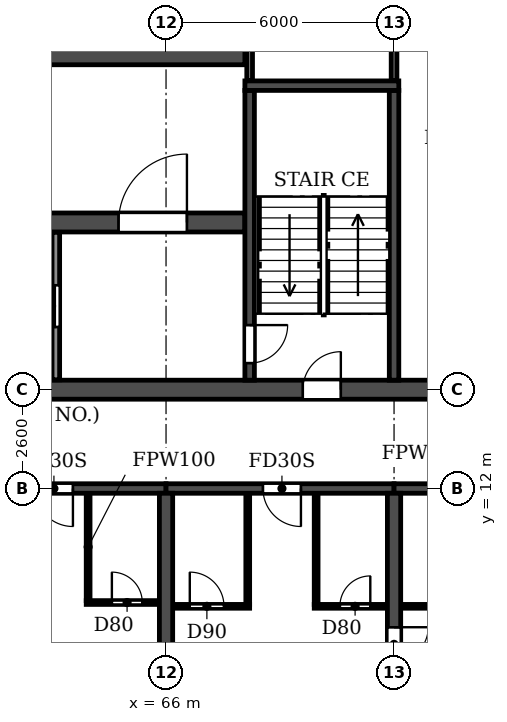
"""IFC4 building model, lengths in metres.
Left out: names, types, materials, properties, quantities, classifications, styles, units other than length and angle.
Written with IfcOpenShell. Run it as: python <this file> out.ifc"""

import sys

from ifc_helpers import new_model, si_unit, direction, frame, frame_2d, origin, place, context, subcontext, project, spatial, rectangle, extrude, element, fill, save


model = new_model("IFC4")
c1 = context("Model", 3, precision=1e-05, world=origin(), true_north=direction((0.0, 1.0)))
c2 = subcontext(c1, "Body", "Model", "MODEL_VIEW")
j1 = project(units=[si_unit("LENGTHUNIT", "METRE"), si_unit("PLANEANGLEUNIT", "RADIAN")], contexts=[c1])
p1 = place(None, origin())
s1 = spatial("IfcSite", under=j1, at=p1, CompositionType="ELEMENT")
p2 = place(p1, origin())
s2 = spatial("IfcBuilding", under=s1, at=p2, CompositionType="ELEMENT")
p3 = place(p2, frame((0.0, 0.0, 102.6)))
s3 = spatial("IfcBuildingStorey", under=s2, at=p3, CompositionType="ELEMENT", Elevation=102.6)
p4 = place(p3, frame((66.0, 0.2, 0.0), z_axis=(0.0, 0.0, 1.0), x_axis=(0.0, 1.0, 0.0)))
e1 = element("IfcWall", 1, at=p4, inside=s3, PredefinedType="SHEAR", context=c2, shape_type="SweptSolid", body=[
    extrude(rectangle(XDim=11.675, YDim=0.35, at=frame_2d((5.837, 0.0))), origin(), (0.0, 0.0, 1.0), 3.0),
])
p5 = place(p3, frame((72.0, 0.2, 0.0), z_axis=(0.0, 0.0, 1.0), x_axis=(0.0, 1.0, 0.0)))
e2 = element("IfcWall", 2, at=p5, inside=s3, PredefinedType="SHEAR", context=c2, shape_type="SweptSolid", body=[
    extrude(rectangle(XDim=11.675, YDim=0.35, at=frame_2d((5.837, 0.0))), origin(), (0.0, 0.0, 1.0), 3.0),
])
p6 = place(p5, frame((7.25, 0.0, 0.0)))
e3 = element("IfcOpeningElement", 3, at=p6, cuts=e2, PredefinedType="OPENING", context=c2, shape_type="SweptSolid", body=[
    extrude(rectangle(XDim=0.9, YDim=2.1, at=frame_2d((0.45, 1.05))), frame((0.0, 0.185, 0.0), z_axis=(0.0, -1.0, 0.0), x_axis=(1.0, 0.0, 0.0)), (0.0, 0.0, 1.0), 0.37),
])
p7 = place(p3, frame((60.0, 12.0, 0.0), z_axis=(0.0, 0.0, 1.0), x_axis=(1.0, 0.0, 0.0)))
e4 = element("IfcWall", 4, at=p7, inside=s3, PredefinedType="SHEAR", context=c2, shape_type="SweptSolid", body=[
    extrude(rectangle(XDim=6.0, YDim=0.25, at=frame_2d((3.0, 0.0))), origin(), (0.0, 0.0, 1.0), 2.4),
])
p8 = place(p7, frame((2.55, 0.0, 0.0)))
e5 = element("IfcOpeningElement", 5, at=p8, cuts=e4, PredefinedType="OPENING", context=c2, shape_type="SweptSolid", body=[
    extrude(rectangle(XDim=1.0, YDim=2.1, at=frame_2d((0.5, 1.05))), frame((0.0, 0.135, 0.0), z_axis=(0.0, -1.0, 0.0), x_axis=(1.0, 0.0, 0.0)), (0.0, 0.0, 1.0), 0.27),
])
p9 = place(p3, frame((66.0, 12.0, 0.0), z_axis=(0.0, 0.0, 1.0), x_axis=(1.0, 0.0, 0.0)))
e6 = element("IfcWall", 6, at=p9, inside=s3, PredefinedType="SHEAR", context=c2, shape_type="SweptSolid", body=[
    extrude(rectangle(XDim=6.0, YDim=0.25, at=frame_2d((3.0, 0.0))), origin(), (0.0, 0.0, 1.0), 2.4),
])
p10 = place(p9, frame((2.55, 0.0, 0.0)))
e7 = element("IfcOpeningElement", 7, at=p10, cuts=e6, PredefinedType="OPENING", context=c2, shape_type="SweptSolid", body=[
    extrude(rectangle(XDim=1.0, YDim=2.1, at=frame_2d((0.5, 1.05))), frame((0.0, 0.135, 0.0), z_axis=(0.0, -1.0, 0.0), x_axis=(1.0, 0.0, 0.0)), (0.0, 0.0, 1.0), 0.27),
])
p11 = place(p3, frame((72.0, 12.0, 0.0), z_axis=(0.0, 0.0, 1.0), x_axis=(1.0, 0.0, 0.0)))
e8 = element("IfcWall", 8, at=p11, inside=s3, PredefinedType="SHEAR", context=c2, shape_type="SweptSolid", body=[
    extrude(rectangle(XDim=6.0, YDim=0.25, at=frame_2d((3.0, 0.0))), origin(), (0.0, 0.0, 1.0), 2.4),
])
p12 = place(p3, frame((8.6, 14.6, 0.0), z_axis=(0.0, 0.0, 1.0), x_axis=(1.0, 0.0, 0.0)))
e9 = element("IfcWall", 9, at=p12, inside=s3, PredefinedType="SOLIDWALL", context=c2, shape_type="SweptSolid", body=[
    extrude(rectangle(XDim=84.8, YDim=0.5, at=frame_2d((42.4, 0.0))), origin(), (0.0, 0.0, 1.0), 3.0),
])
p13 = place(p12, frame((0.9, 0.0, 0.0)))
e10 = element("IfcOpeningElement", 10, at=p13, cuts=e9, PredefinedType="OPENING", context=c2, shape_type="SweptSolid", body=[
    extrude(rectangle(XDim=1.0, YDim=2.1, at=frame_2d((0.5, 1.05))), frame((0.0, 0.26, 0.0), z_axis=(0.0, -1.0, 0.0), x_axis=(1.0, 0.0, 0.0)), (0.0, 0.0, 1.0), 0.52),
])
p14 = place(p12, frame((5.6, 0.0, 0.0)))
e11 = element("IfcOpeningElement", 11, at=p14, cuts=e9, PredefinedType="OPENING", context=c2, shape_type="SweptSolid", body=[
    extrude(rectangle(XDim=1.0, YDim=2.1, at=frame_2d((0.5, 1.05))), frame((0.0, 0.26, 0.0), z_axis=(0.0, -1.0, 0.0), x_axis=(1.0, 0.0, 0.0)), (0.0, 0.0, 1.0), 0.52),
])
p15 = place(p12, frame((10.3, 0.0, 0.0)))
e12 = element("IfcOpeningElement", 12, at=p15, cuts=e9, PredefinedType="OPENING", context=c2, shape_type="SweptSolid", body=[
    extrude(rectangle(XDim=1.0, YDim=2.1, at=frame_2d((0.5, 1.05))), frame((0.0, 0.26, 0.0), z_axis=(0.0, -1.0, 0.0), x_axis=(1.0, 0.0, 0.0)), (0.0, 0.0, 1.0), 0.52),
])
p16 = place(p12, frame((18.2, 0.0, 0.0)))
e13 = element("IfcOpeningElement", 13, at=p16, cuts=e9, PredefinedType="OPENING", context=c2, shape_type="SweptSolid", body=[
    extrude(rectangle(XDim=1.0, YDim=2.1, at=frame_2d((0.5, 1.05))), frame((0.0, 0.26, 0.0), z_axis=(0.0, -1.0, 0.0), x_axis=(1.0, 0.0, 0.0)), (0.0, 0.0, 1.0), 0.52),
])
p17 = place(p12, frame((22.8, 0.0, 0.0)))
e14 = element("IfcOpeningElement", 14, at=p17, cuts=e9, PredefinedType="OPENING", context=c2, shape_type="SweptSolid", body=[
    extrude(rectangle(XDim=1.0, YDim=2.1, at=frame_2d((0.5, 1.05))), frame((0.0, 0.26, 0.0), z_axis=(0.0, -1.0, 0.0), x_axis=(1.0, 0.0, 0.0)), (0.0, 0.0, 1.0), 0.52),
])
p18 = place(p12, frame((36.7, 0.0, 0.0)))
e15 = element("IfcOpeningElement", 15, at=p18, cuts=e9, PredefinedType="OPENING", context=c2, shape_type="SweptSolid", body=[
    extrude(rectangle(XDim=1.0, YDim=2.1, at=frame_2d((0.5, 1.05))), frame((0.0, 0.26, 0.0), z_axis=(0.0, -1.0, 0.0), x_axis=(1.0, 0.0, 0.0)), (0.0, 0.0, 1.0), 0.52),
])
p19 = place(p12, frame((41.9, 0.0, 0.0)))
e16 = element("IfcOpeningElement", 16, at=p19, cuts=e9, PredefinedType="OPENING", context=c2, shape_type="SweptSolid", body=[
    extrude(rectangle(XDim=1.0, YDim=2.1, at=frame_2d((0.5, 1.05))), frame((0.0, 0.26, 0.0), z_axis=(0.0, -1.0, 0.0), x_axis=(1.0, 0.0, 0.0)), (0.0, 0.0, 1.0), 0.52),
])
p20 = place(p12, frame((47.1, 0.0, 0.0)))
e17 = element("IfcOpeningElement", 17, at=p20, cuts=e9, PredefinedType="OPENING", context=c2, shape_type="SweptSolid", body=[
    extrude(rectangle(XDim=1.0, YDim=2.1, at=frame_2d((0.5, 1.05))), frame((0.0, 0.26, 0.0), z_axis=(0.0, -1.0, 0.0), x_axis=(1.0, 0.0, 0.0)), (0.0, 0.0, 1.0), 0.52),
])
p21 = place(p12, frame((61.0, 0.0, 0.0)))
e18 = element("IfcOpeningElement", 18, at=p21, cuts=e9, PredefinedType="OPENING", context=c2, shape_type="SweptSolid", body=[
    extrude(rectangle(XDim=1.0, YDim=2.1, at=frame_2d((0.5, 1.05))), frame((0.0, 0.26, 0.0), z_axis=(0.0, -1.0, 0.0), x_axis=(1.0, 0.0, 0.0)), (0.0, 0.0, 1.0), 0.52),
])
p22 = place(p12, frame((65.6, 0.0, 0.0)))
e19 = element("IfcOpeningElement", 19, at=p22, cuts=e9, PredefinedType="OPENING", context=c2, shape_type="SweptSolid", body=[
    extrude(rectangle(XDim=1.0, YDim=2.1, at=frame_2d((0.5, 1.05))), frame((0.0, 0.26, 0.0), z_axis=(0.0, -1.0, 0.0), x_axis=(1.0, 0.0, 0.0)), (0.0, 0.0, 1.0), 0.52),
])
p23 = place(p12, frame((73.5, 0.0, 0.0)))
e20 = element("IfcOpeningElement", 20, at=p23, cuts=e9, PredefinedType="OPENING", context=c2, shape_type="SweptSolid", body=[
    extrude(rectangle(XDim=1.0, YDim=2.1, at=frame_2d((0.5, 1.05))), frame((0.0, 0.26, 0.0), z_axis=(0.0, -1.0, 0.0), x_axis=(1.0, 0.0, 0.0)), (0.0, 0.0, 1.0), 0.52),
])
p24 = place(p12, frame((79.6, 0.0, 0.0)))
e21 = element("IfcOpeningElement", 21, at=p24, cuts=e9, PredefinedType="OPENING", context=c2, shape_type="SweptSolid", body=[
    extrude(rectangle(XDim=1.0, YDim=2.1, at=frame_2d((0.5, 1.05))), frame((0.0, 0.26, 0.0), z_axis=(0.0, -1.0, 0.0), x_axis=(1.0, 0.0, 0.0)), (0.0, 0.0, 1.0), 0.52),
])
p25 = place(p3, frame((33.925, 19.0, 0.0), z_axis=(0.0, 0.0, 1.0), x_axis=(1.0, 0.0, 0.0)))
e22 = element("IfcWall", 22, at=p25, inside=s3, PredefinedType="SOLIDWALL", context=c2, shape_type="SweptSolid", body=[
    extrude(rectangle(XDim=34.15, YDim=0.5, at=frame_2d((17.075, 0.0))), origin(), (0.0, 0.0, 1.0), 3.0),
])
p26 = place(p25, frame((16.175, 0.0, 0.0)))
e23 = element("IfcOpeningElement", 23, at=p26, cuts=e22, PredefinedType="OPENING", context=c2, shape_type="SweptSolid", body=[
    extrude(rectangle(XDim=1.8, YDim=2.1, at=frame_2d((0.9, 1.05))), frame((0.0, 0.26, 0.0), z_axis=(0.0, -1.0, 0.0), x_axis=(1.0, 0.0, 0.0)), (0.0, 0.0, 1.0), 0.52),
])
p27 = place(p25, frame((1.525, 0.0, 0.0)))
e24 = element("IfcOpeningElement", 24, at=p27, cuts=e22, PredefinedType="OPENING", context=c2, shape_type="SweptSolid", body=[
    extrude(rectangle(XDim=1.8, YDim=2.1, at=frame_2d((0.9, 1.05))), frame((0.0, 0.26, 0.0), z_axis=(0.0, -1.0, 0.0), x_axis=(1.0, 0.0, 0.0)), (0.0, 0.0, 1.0), 0.52),
])
p28 = place(p25, frame((8.725, 0.0, 0.0)))
e25 = element("IfcOpeningElement", 25, at=p28, cuts=e22, PredefinedType="OPENING", context=c2, shape_type="SweptSolid", body=[
    extrude(rectangle(XDim=1.1, YDim=2.1, at=frame_2d((0.55, 1.05))), frame((0.0, 0.26, 0.0), z_axis=(0.0, -1.0, 0.0), x_axis=(1.0, 0.0, 0.0)), (0.0, 0.0, 1.0), 0.52),
])
p29 = place(p25, frame((11.325, 0.0, 0.0)))
e26 = element("IfcOpeningElement", 26, at=p29, cuts=e22, PredefinedType="OPENING", context=c2, shape_type="SweptSolid", body=[
    extrude(rectangle(XDim=1.1, YDim=2.1, at=frame_2d((0.55, 1.05))), frame((0.0, 0.26, 0.0), z_axis=(0.0, -1.0, 0.0), x_axis=(1.0, 0.0, 0.0)), (0.0, 0.0, 1.0), 0.52),
])
p30 = place(p25, frame((13.925, 0.0, 0.0)))
e27 = element("IfcOpeningElement", 27, at=p30, cuts=e22, PredefinedType="OPENING", context=c2, shape_type="SweptSolid", body=[
    extrude(rectangle(XDim=1.1, YDim=2.1, at=frame_2d((0.55, 1.05))), frame((0.0, 0.26, 0.0), z_axis=(0.0, -1.0, 0.0), x_axis=(1.0, 0.0, 0.0)), (0.0, 0.0, 1.0), 0.52),
])
p31 = place(p25, frame((19.125, 0.0, 0.0)))
e28 = element("IfcOpeningElement", 28, at=p31, cuts=e22, PredefinedType="OPENING", context=c2, shape_type="SweptSolid", body=[
    extrude(rectangle(XDim=1.1, YDim=2.1, at=frame_2d((0.55, 1.05))), frame((0.0, 0.26, 0.0), z_axis=(0.0, -1.0, 0.0), x_axis=(1.0, 0.0, 0.0)), (0.0, 0.0, 1.0), 0.52),
])
p32 = place(p25, frame((21.725, 0.0, 0.0)))
e29 = element("IfcOpeningElement", 29, at=p32, cuts=e22, PredefinedType="OPENING", context=c2, shape_type="SweptSolid", body=[
    extrude(rectangle(XDim=1.1, YDim=2.1, at=frame_2d((0.55, 1.05))), frame((0.0, 0.26, 0.0), z_axis=(0.0, -1.0, 0.0), x_axis=(1.0, 0.0, 0.0)), (0.0, 0.0, 1.0), 0.52),
])
p33 = place(p25, frame((24.325, 0.0, 0.0)))
e30 = element("IfcOpeningElement", 30, at=p33, cuts=e22, PredefinedType="OPENING", context=c2, shape_type="SweptSolid", body=[
    extrude(rectangle(XDim=1.1, YDim=2.1, at=frame_2d((0.55, 1.05))), frame((0.0, 0.26, 0.0), z_axis=(0.0, -1.0, 0.0), x_axis=(1.0, 0.0, 0.0)), (0.0, 0.0, 1.0), 0.52),
])
p34 = place(p25, frame((30.825, 0.0, 0.0)))
e31 = element("IfcOpeningElement", 31, at=p34, cuts=e22, PredefinedType="OPENING", context=c2, shape_type="SweptSolid", body=[
    extrude(rectangle(XDim=1.8, YDim=2.1, at=frame_2d((0.9, 1.05))), frame((0.0, 0.26, 0.0), z_axis=(0.0, -1.0, 0.0), x_axis=(1.0, 0.0, 0.0)), (0.0, 0.0, 1.0), 0.52),
])
p35 = place(p3, frame((33.925, 23.4, 0.0), z_axis=(0.0, 0.0, 1.0), x_axis=(1.0, 0.0, 0.0)))
e32 = element("IfcWall", 32, at=p35, inside=s3, PredefinedType="SOLIDWALL", context=c2, shape_type="SweptSolid", body=[
    extrude(rectangle(XDim=34.15, YDim=0.5, at=frame_2d((17.075, 0.0))), origin(), (0.0, 0.0, 1.0), 3.0),
])
p36 = place(p35, frame((16.175, 0.0, 0.0)))
e33 = element("IfcOpeningElement", 33, at=p36, cuts=e32, PredefinedType="OPENING", context=c2, shape_type="SweptSolid", body=[
    extrude(rectangle(XDim=1.8, YDim=2.1, at=frame_2d((0.9, 1.05))), frame((0.0, 0.26, 0.0), z_axis=(0.0, -1.0, 0.0), x_axis=(1.0, 0.0, 0.0)), (0.0, 0.0, 1.0), 0.52),
])
p37 = place(p35, frame((11.025, 0.0, 0.0)))
e34 = element("IfcOpeningElement", 34, at=p37, cuts=e32, PredefinedType="OPENING", context=c2, shape_type="SweptSolid", body=[
    extrude(rectangle(XDim=1.1, YDim=2.1, at=frame_2d((0.55, 1.05))), frame((0.0, 0.26, 0.0), z_axis=(0.0, -1.0, 0.0), x_axis=(1.0, 0.0, 0.0)), (0.0, 0.0, 1.0), 0.52),
])
p38 = place(p3, frame((68.2, 14.85, 0.0), z_axis=(0.0, 0.0, 1.0), x_axis=(0.0, 1.0, 0.0)))
e35 = element("IfcWall", 35, at=p38, inside=s3, PredefinedType="SOLIDWALL", context=c2, shape_type="SweptSolid", body=[
    extrude(rectangle(XDim=7.625, YDim=0.25, at=frame_2d((3.812, 0.0))), origin(), (0.0, 0.0, 1.0), 3.0),
])
p39 = place(p38, frame((0.45, 0.0, 0.0)))
e36 = element("IfcOpeningElement", 36, at=p39, cuts=e35, PredefinedType="OPENING", context=c2, shape_type="SweptSolid", body=[
    extrude(rectangle(XDim=1.0, YDim=2.1, at=frame_2d((0.5, 1.05))), frame((0.0, 0.135, 0.0), z_axis=(0.0, -1.0, 0.0), x_axis=(1.0, 0.0, 0.0)), (0.0, 0.0, 1.0), 0.27),
])
p40 = place(p3, frame((72.0, 14.85, 0.0), z_axis=(0.0, 0.0, 1.0), x_axis=(0.0, 1.0, 0.0)))
e37 = element("IfcWall", 37, at=p40, inside=s3, PredefinedType="SOLIDWALL", context=c2, shape_type="SweptSolid", body=[
    extrude(rectangle(XDim=7.625, YDim=0.25, at=frame_2d((3.812, 0.0))), origin(), (0.0, 0.0, 1.0), 3.0),
])
p41 = place(p3, frame((68.075, 22.6, 0.0), z_axis=(0.0, 0.0, 1.0), x_axis=(1.0, 0.0, 0.0)))
e38 = element("IfcWall", 38, at=p41, inside=s3, PredefinedType="SOLIDWALL", context=c2, shape_type="SweptSolid", body=[
    extrude(rectangle(XDim=4.05, YDim=0.25, at=frame_2d((2.025, 0.0))), origin(), (0.0, 0.0, 1.0), 3.0),
])
p42 = place(p3, frame((66.185, 8.9, 0.0), z_axis=(0.0, 0.0, 1.0), x_axis=(1.0, 0.0, 0.0)))
e39 = element("IfcWall", 39, at=p42, inside=s3, PredefinedType="PARTITIONING", context=c2, shape_type="SweptSolid", body=[
    extrude(rectangle(XDim=2.015, YDim=0.1, at=frame_2d((1.007, 0.0))), origin(), (0.0, 0.0, 1.0), 3.0),
])
p43 = place(p42, frame((0.44, 0.0, 0.0)))
e40 = element("IfcOpeningElement", 40, at=p43, cuts=e39, PredefinedType="OPENING", context=c2, shape_type="SweptSolid", body=[
    extrude(rectangle(XDim=0.9, YDim=2.1, at=frame_2d((0.45, 1.05))), frame((0.0, 0.06, 0.0), z_axis=(0.0, -1.0, 0.0), x_axis=(1.0, 0.0, 0.0)), (0.0, 0.0, 1.0), 0.12),
])
p44 = place(p3, frame((69.9, 8.9, 0.0), z_axis=(0.0, 0.0, 1.0), x_axis=(1.0, 0.0, 0.0)))
e41 = element("IfcWall", 41, at=p44, inside=s3, PredefinedType="PARTITIONING", context=c2, shape_type="SweptSolid", body=[
    extrude(rectangle(XDim=1.915, YDim=0.1, at=frame_2d((0.958, 0.0))), origin(), (0.0, 0.0, 1.0), 3.0),
])
p45 = place(p44, frame((0.675, 0.0, 0.0)))
e42 = element("IfcOpeningElement", 42, at=p45, cuts=e41, PredefinedType="OPENING", context=c2, shape_type="SweptSolid", body=[
    extrude(rectangle(XDim=0.8, YDim=2.1, at=frame_2d((0.4, 1.05))), frame((0.0, 0.06, 0.0), z_axis=(0.0, -1.0, 0.0), x_axis=(1.0, 0.0, 0.0)), (0.0, 0.0, 1.0), 0.12),
])
p46 = place(p3, frame((72.185, 8.9, 0.0), z_axis=(0.0, 0.0, 1.0), x_axis=(1.0, 0.0, 0.0)))
e43 = element("IfcWall", 43, at=p46, inside=s3, PredefinedType="PARTITIONING", context=c2, shape_type="SweptSolid", body=[
    extrude(rectangle(XDim=2.715, YDim=0.1, at=frame_2d((1.357, 0.0))), origin(), (0.0, 0.0, 1.0), 3.0),
])
p47 = place(p46, frame((0.915, 0.0, 0.0)))
e44 = element("IfcOpeningElement", 44, at=p47, cuts=e43, PredefinedType="OPENING", context=c2, shape_type="SweptSolid", body=[
    extrude(rectangle(XDim=0.8, YDim=2.1, at=frame_2d((0.4, 1.05))), frame((0.0, 0.06, 0.0), z_axis=(0.0, -1.0, 0.0), x_axis=(1.0, 0.0, 0.0)), (0.0, 0.0, 1.0), 0.12),
])
p48 = place(p3, frame((63.9, 9.0, 0.0), z_axis=(0.0, 0.0, 1.0), x_axis=(1.0, 0.0, 0.0)))
e45 = element("IfcWall", 45, at=p48, inside=s3, PredefinedType="PARTITIONING", context=c2, shape_type="SweptSolid", body=[
    extrude(rectangle(XDim=1.915, YDim=0.1, at=frame_2d((0.958, 0.0))), origin(), (0.0, 0.0, 1.0), 3.0),
])
p49 = place(p48, frame((0.675, 0.0, 0.0)))
e46 = element("IfcOpeningElement", 46, at=p49, cuts=e45, PredefinedType="OPENING", context=c2, shape_type="SweptSolid", body=[
    extrude(rectangle(XDim=0.8, YDim=2.1, at=frame_2d((0.4, 1.05))), frame((0.0, 0.06, 0.0), z_axis=(0.0, -1.0, 0.0), x_axis=(1.0, 0.0, 0.0)), (0.0, 0.0, 1.0), 0.12),
])
p50 = place(p3, frame((63.95, 9.05, 0.0), z_axis=(0.0, 0.0, 1.0), x_axis=(0.0, 1.0, 0.0)))
e47 = element("IfcWall", 47, at=p50, inside=s3, PredefinedType="PARTITIONING", context=c2, shape_type="SweptSolid", body=[
    extrude(rectangle(XDim=2.815, YDim=0.1, at=frame_2d((1.407, 0.0))), origin(), (0.0, 0.0, 1.0), 3.0),
])
for number, where, z_axis, x_axis in (
    (48, (68.15, 8.95, 0.0), (0.0, 0.0, 1.0), (0.0, 1.0, 0.0)),
    (49, (69.95, 8.95, 0.0), (0.0, 0.0, 1.0), (0.0, 1.0, 0.0)),
):
    element("IfcWall", number, at=place(p3, frame(where, z_axis=z_axis, x_axis=x_axis)), inside=s3, PredefinedType="PARTITIONING", context=c2, shape_type="SweptSolid", body=[
        extrude(rectangle(XDim=2.915, YDim=0.1, at=frame_2d((1.458, 0.0))), origin(), (0.0, 0.0, 1.0), 3.0),
    ])
for number, where, z_axis, x_axis in (
    (50, (68.2, 22.735, 0.0), (0.0, 0.0, 1.0), (0.0, 1.0, 0.0)),
    (51, (72.0, 22.735, 0.0), (0.0, 0.0, 1.0), (0.0, 1.0, 0.0)),
):
    element("IfcWall", number, at=place(p3, frame(where, z_axis=z_axis, x_axis=x_axis)), inside=s3, PredefinedType="PARTITIONING", context=c2, shape_type="SweptSolid", body=[
        extrude(rectangle(XDim=4.805, YDim=0.15, at=frame_2d((2.402, 0.0))), origin(), (0.0, 0.0, 1.0), 3.0),
    ])
p51 = place(p3, frame((63.1, 14.86, 0.0), z_axis=(0.0, 0.0, 1.0), x_axis=(0.0, 1.0, 0.0)))
e52 = element("IfcWall", 52, at=p51, inside=s3, PredefinedType="PARTITIONING", context=c2, shape_type="SweptSolid", body=[
    extrude(rectangle(XDim=3.88, YDim=0.2, at=frame_2d((1.94, 0.0))), origin(), (0.0, 0.0, 1.0), 3.0),
])
p52 = place(p51, frame((1.39, 0.0, 0.0)))
e53 = element("IfcOpeningElement", 53, at=p52, cuts=e52, PredefinedType="OPENING", context=c2, shape_type="SweptSolid", body=[
    extrude(rectangle(XDim=1.1, YDim=2.1, at=frame_2d((0.55, 1.05))), frame((0.0, 0.11, 0.0), z_axis=(0.0, -1.0, 0.0), x_axis=(1.0, 0.0, 0.0)), (0.0, 0.0, 1.0), 0.22),
])
p53 = place(p21, origin())
e54 = element("IfcDoor", 54, at=p53, inside=s3, OperationType="SINGLE_SWING_RIGHT", PredefinedType="DOOR", context=c2, shape_type="SweptSolid", body=[
    extrude(rectangle(XDim=1.0, YDim=2.1, at=frame_2d((0.5, 1.05))), frame((0.0, 0.025, 0.0), z_axis=(0.0, -1.0, 0.0), x_axis=(1.0, 0.0, 0.0)), (0.0, 0.0, 1.0), 0.05),
])
fill(e18, e54)
p54 = place(p8, frame((1.0, 0.0, 0.0), z_axis=(0.0, 0.0, 1.0), x_axis=(-1.0, 0.0, 0.0)))
e55 = element("IfcDoor", 55, at=p54, inside=s3, OperationType="SINGLE_SWING_LEFT", PredefinedType="DOOR", context=c2, shape_type="SweptSolid", body=[
    extrude(rectangle(XDim=1.0, YDim=2.1, at=frame_2d((0.5, 1.05))), frame((0.0, 0.025, 0.0), z_axis=(0.0, -1.0, 0.0), x_axis=(1.0, 0.0, 0.0)), (0.0, 0.0, 1.0), 0.05),
])
fill(e5, e55)
p55 = place(p49, origin())
e56 = element("IfcDoor", 56, at=p55, inside=s3, OperationType="SINGLE_SWING_LEFT", PredefinedType="DOOR", context=c2, shape_type="SweptSolid", body=[
    extrude(rectangle(XDim=0.8, YDim=2.1, at=frame_2d((0.4, 1.05))), frame((0.0, 0.025, 0.0), z_axis=(0.0, -1.0, 0.0), x_axis=(1.0, 0.0, 0.0)), (0.0, 0.0, 1.0), 0.05),
])
fill(e46, e56)
p56 = place(p43, origin())
e57 = element("IfcDoor", 57, at=p56, inside=s3, OperationType="SINGLE_SWING_LEFT", PredefinedType="DOOR", context=c2, shape_type="SweptSolid", body=[
    extrude(rectangle(XDim=0.9, YDim=2.1, at=frame_2d((0.45, 1.05))), frame((0.0, 0.025, 0.0), z_axis=(0.0, -1.0, 0.0), x_axis=(1.0, 0.0, 0.0)), (0.0, 0.0, 1.0), 0.05),
])
fill(e40, e57)
p57 = place(p10, frame((1.0, 0.0, 0.0), z_axis=(0.0, 0.0, 1.0), x_axis=(-1.0, 0.0, 0.0)))
e58 = element("IfcDoor", 58, at=p57, inside=s3, OperationType="SINGLE_SWING_LEFT", PredefinedType="DOOR", context=c2, shape_type="SweptSolid", body=[
    extrude(rectangle(XDim=1.0, YDim=2.1, at=frame_2d((0.5, 1.05))), frame((0.0, 0.025, 0.0), z_axis=(0.0, -1.0, 0.0), x_axis=(1.0, 0.0, 0.0)), (0.0, 0.0, 1.0), 0.05),
])
fill(e7, e58)
p58 = place(p45, origin())
e59 = element("IfcDoor", 59, at=p58, inside=s3, OperationType="SINGLE_SWING_RIGHT", PredefinedType="DOOR", context=c2, shape_type="SweptSolid", body=[
    extrude(rectangle(XDim=0.8, YDim=2.1, at=frame_2d((0.4, 1.05))), frame((0.0, 0.025, 0.0), z_axis=(0.0, -1.0, 0.0), x_axis=(1.0, 0.0, 0.0)), (0.0, 0.0, 1.0), 0.05),
])
fill(e42, e59)
p59 = place(p6, frame((0.9, 0.0, 0.0), z_axis=(0.0, 0.0, 1.0), x_axis=(-1.0, 0.0, 0.0)))
e60 = element("IfcDoor", 60, at=p59, inside=s3, OperationType="SINGLE_SWING_LEFT", PredefinedType="DOOR", context=c2, shape_type="SweptSolid", body=[
    extrude(rectangle(XDim=0.9, YDim=2.1, at=frame_2d((0.45, 1.05))), frame((0.0, 0.025, 0.0), z_axis=(0.0, -1.0, 0.0), x_axis=(1.0, 0.0, 0.0)), (0.0, 0.0, 1.0), 0.05),
])
fill(e3, e60)
p60 = place(p52, origin())
e61 = element("IfcDoor", 61, at=p60, inside=s3, OperationType="DOUBLE_DOOR_SLIDING", PredefinedType="DOOR", context=c2, shape_type="SweptSolid", body=[
    extrude(rectangle(XDim=1.1, YDim=2.1, at=frame_2d((0.55, 1.05))), frame((0.0, 0.025, 0.0), z_axis=(0.0, -1.0, 0.0), x_axis=(1.0, 0.0, 0.0)), (0.0, 0.0, 1.0), 0.05),
])
fill(e53, e61)
p61 = place(p39, frame((1.0, 0.0, 0.0), z_axis=(0.0, 0.0, 1.0), x_axis=(-1.0, 0.0, 0.0)))
e62 = element("IfcDoor", 62, at=p61, inside=s3, OperationType="SINGLE_SWING_LEFT", PredefinedType="DOOR", context=c2, shape_type="SweptSolid", body=[
    extrude(rectangle(XDim=1.0, YDim=2.1, at=frame_2d((0.5, 1.05))), frame((0.0, 0.025, 0.0), z_axis=(0.0, -1.0, 0.0), x_axis=(1.0, 0.0, 0.0)), (0.0, 0.0, 1.0), 0.05),
])
fill(e36, e62)
p62 = place(p34, origin())
e63 = element("IfcDoor", 63, at=p62, inside=s3, OperationType="DOUBLE_DOOR_SINGLE_SWING", PredefinedType="DOOR", context=c2, shape_type="SweptSolid", body=[
    extrude(rectangle(XDim=1.8, YDim=2.1, at=frame_2d((0.9, 1.05))), frame((0.0, 0.025, 0.0), z_axis=(0.0, -1.0, 0.0), x_axis=(1.0, 0.0, 0.0)), (0.0, 0.0, 1.0), 0.05),
])
fill(e31, e63)
save(model, sys.argv[1])
